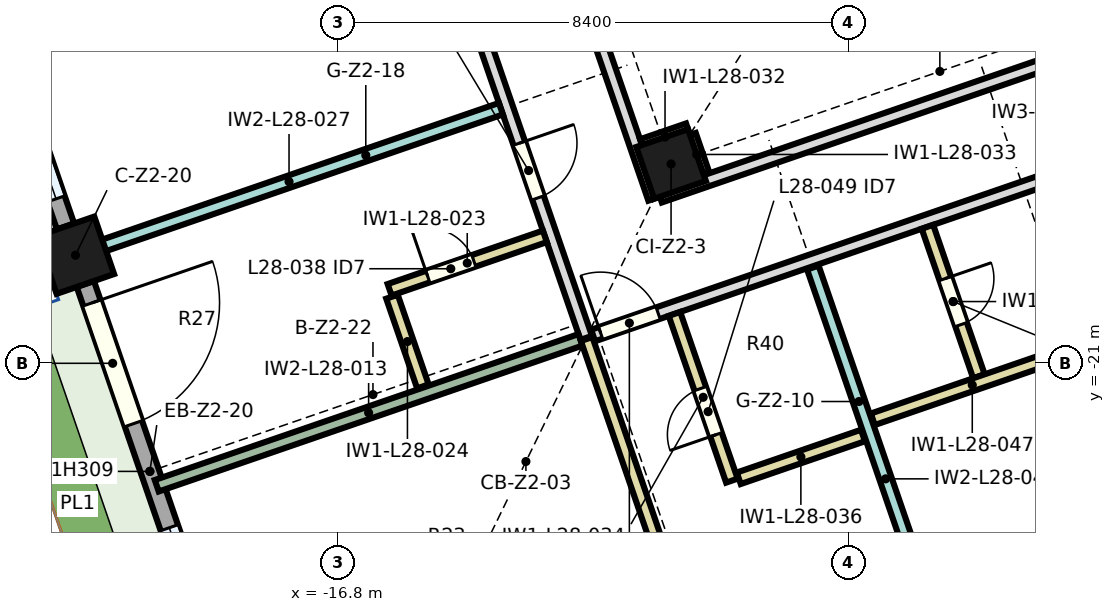
"""IFC4 building model, lengths in metres.
Left out: names, types, materials, properties, quantities, classifications, styles, units other than length and angle.
Written with IfcOpenShell. Run it as: python <this file> out.ifc"""

import sys

from ifc_helpers import new_model, si_unit, direction, frame, frame_2d, origin, origin_2d, place, context, subcontext, project, spatial, rectangle, extrude, element, fill, save


model = new_model("IFC4")
c1 = context("Model", 3, precision=1e-05, world=origin(), true_north=direction((0.0, 1.0)))
c2 = subcontext(c1, "Body", "Model", "MODEL_VIEW")
j1 = project(units=[si_unit("LENGTHUNIT", "METRE"), si_unit("PLANEANGLEUNIT", "RADIAN")], contexts=[c1])
p1 = place(None, origin())
s1 = spatial("IfcSite", under=j1, at=p1, CompositionType="ELEMENT")
p2 = place(p1, origin())
s2 = spatial("IfcBuilding", under=s1, at=p2, CompositionType="ELEMENT")
p3 = place(p2, frame((0.0, 0.0, 134.5)))
s3 = spatial("IfcBuildingStorey", under=s2, at=p3, CompositionType="ELEMENT", Elevation=134.5)
p4 = place(p3, frame((-21.1, -19.195, 0.0), z_axis=(0.0, 0.0, 1.0), x_axis=(0.945518575599, 0.325568154457, 0.0)))
e1 = element("IfcColumn", 1, at=p4, inside=s3, PredefinedType="COLUMN", context=c2, shape_type="SweptSolid", body=[
    extrude(rectangle(XDim=1.0, YDim=1.0, at=origin_2d()), origin(), (0.0, 0.0, 1.0), 3.55),
])
p5 = place(p3, frame((-11.305, -17.695, 0.0), z_axis=(0.0, 0.0, 1.0), x_axis=(0.945518575599, 0.325568154457, 0.0)))
e2 = element("IfcColumn", 2, at=p5, inside=s3, PredefinedType="COLUMN", context=c2, shape_type="SweptSolid", body=[
    extrude(rectangle(XDim=0.9, YDim=0.9, at=origin_2d()), origin(), (0.0, 0.0, 1.0), 3.55),
])
p6 = place(p3, frame((-23.386, -12.558, 0.0), z_axis=(0.0, 0.0, 1.0), x_axis=(0.325580990241, -0.945514155787, 0.0)))
e3 = element("IfcWall", 3, at=p6, inside=s3, PredefinedType="SOLIDWALL", context=c2, shape_type="SweptSolid", body=[
    extrude(rectangle(XDim=6.52, YDim=0.3, at=frame_2d((3.26, 0.0))), origin(), (0.0, 0.0, 1.0), 3.09),
])
p7 = place(p6, frame((0.33, 0.0, 0.0)))
e4 = element("IfcOpeningElement", 4, at=p7, cuts=e3, PredefinedType="OPENING", context=c2, shape_type="SweptSolid", body=[
    extrude(rectangle(XDim=2.1, YDim=2.4, at=frame_2d((1.05, 1.2))), frame((0.0, 0.16, 0.0), z_axis=(0.0, -1.0, 0.0), x_axis=(1.0, 0.0, 0.0)), (0.0, 0.0, 1.0), 0.32),
])
p8 = place(p6, frame((4.24, 0.0, 0.9)))
e5 = element("IfcOpeningElement", 5, at=p8, cuts=e3, PredefinedType="OPENING", context=c2, shape_type="SweptSolid", body=[
    extrude(rectangle(XDim=1.8, YDim=1.5, at=frame_2d((0.9, 0.75))), frame((0.0, 0.16, 0.0), z_axis=(0.0, -1.0, 0.0), x_axis=(1.0, 0.0, 0.0)), (0.0, 0.0, 1.0), 0.32),
])
p9 = place(p3, frame((-20.938, -19.668, 0.0), z_axis=(0.0, 0.0, 1.0), x_axis=(0.325592517631, -0.945510186335, 0.0)))
e6 = element("IfcWall", 6, at=p9, inside=s3, PredefinedType="SOLIDWALL", context=c2, shape_type="SweptSolid", body=[
    extrude(rectangle(XDim=6.52, YDim=0.3, at=frame_2d((3.26, 0.0))), origin(), (0.0, 0.0, 1.0), 3.09),
])
p10 = place(p9, frame((0.33, 0.0, 0.0)))
e7 = element("IfcOpeningElement", 7, at=p10, cuts=e6, PredefinedType="OPENING", context=c2, shape_type="SweptSolid", body=[
    extrude(rectangle(XDim=2.1, YDim=2.4, at=frame_2d((1.05, 1.2))), frame((0.0, 0.16, 0.0), z_axis=(0.0, -1.0, 0.0), x_axis=(1.0, 0.0, 0.0)), (0.0, 0.0, 1.0), 0.32),
])
p11 = place(p9, frame((4.24, 0.0, 0.9)))
e8 = element("IfcOpeningElement", 8, at=p11, cuts=e6, PredefinedType="OPENING", context=c2, shape_type="SweptSolid", body=[
    extrude(rectangle(XDim=1.8, YDim=1.5, at=frame_2d((0.9, 0.75))), frame((0.0, 0.16, 0.0), z_axis=(0.0, -1.0, 0.0), x_axis=(1.0, 0.0, 0.0)), (0.0, 0.0, 1.0), 0.32),
])
p12 = place(p3, frame((-22.623, 8.265, 0.0), z_axis=(0.0, 0.0, 1.0), x_axis=(0.325567058058, -0.945518953119, 0.0)))
e9 = element("IfcWall", 9, at=p12, inside=s3, PredefinedType="PARTITIONING", context=c2, shape_type="SweptSolid", body=[
    extrude(rectangle(XDim=30.48, YDim=0.2, at=frame_2d((15.24, 0.0))), origin(), (0.0, 0.0, 1.0), 3.55),
])
p13 = place(p12, frame((4.195, 0.0, 0.0)))
e10 = element("IfcOpeningElement", 10, at=p13, cuts=e9, PredefinedType="OPENING", context=c2, shape_type="SweptSolid", body=[
    extrude(rectangle(XDim=0.95, YDim=2.1, at=frame_2d((0.475, 1.05))), frame((0.0, 0.11, 0.0), z_axis=(0.0, -1.0, 0.0), x_axis=(1.0, 0.0, 0.0)), (0.0, 0.0, 1.0), 0.22),
])
p14 = place(p12, frame((10.045, 0.0, 0.0)))
e11 = element("IfcOpeningElement", 11, at=p14, cuts=e9, PredefinedType="OPENING", context=c2, shape_type="SweptSolid", body=[
    extrude(rectangle(XDim=0.95, YDim=2.1, at=frame_2d((0.475, 1.05))), frame((0.0, 0.11, 0.0), z_axis=(0.0, -1.0, 0.0), x_axis=(1.0, 0.0, 0.0)), (0.0, 0.0, 1.0), 0.22),
])
p15 = place(p12, frame((21.42, 0.0, 0.0)))
e12 = element("IfcOpeningElement", 12, at=p15, cuts=e9, PredefinedType="OPENING", context=c2, shape_type="SweptSolid", body=[
    extrude(rectangle(XDim=1.0, YDim=2.1, at=frame_2d((0.5, 1.05))), frame((0.0, 0.11, 0.0), z_axis=(0.0, -1.0, 0.0), x_axis=(1.0, 0.0, 0.0)), (0.0, 0.0, 1.0), 0.22),
])
p16 = place(p12, frame((27.095, 0.0, 0.0)))
e13 = element("IfcOpeningElement", 13, at=p16, cuts=e9, PredefinedType="OPENING", context=c2, shape_type="SweptSolid", body=[
    extrude(rectangle(XDim=0.95, YDim=2.1, at=frame_2d((0.475, 1.05))), frame((0.0, 0.11, 0.0), z_axis=(0.0, -1.0, 0.0), x_axis=(1.0, 0.0, 0.0)), (0.0, 0.0, 1.0), 0.22),
])
p17 = place(p3, frame((-19.763, -22.987, 0.0), z_axis=(0.0, 0.0, 1.0), x_axis=(0.945516523202, 0.32557411499, 0.0)))
e14 = element("IfcWall", 14, at=p17, inside=s3, PredefinedType="PARTITIONING", context=c2, shape_type="SweptSolid", body=[
    extrude(rectangle(XDim=7.37, YDim=0.2, at=frame_2d((3.685, 0.0))), origin(), (0.0, 0.0, 1.0), 3.55),
])
p18 = place(p3, frame((-17.892, 0.051, 0.0), z_axis=(0.0, 0.0, 1.0), x_axis=(0.325580537834, -0.94551431157, 0.0)))
e15 = element("IfcWall", 15, at=p18, inside=s3, PredefinedType="PARTITIONING", context=c2, shape_type="SweptSolid", body=[
    extrude(rectangle(XDim=19.374, YDim=0.2, at=frame_2d((9.687, 0.0))), origin(), (0.0, 0.0, 1.0), 3.55),
])
p19 = place(p18, frame((9.786, 0.0, 0.0)))
e16 = element("IfcOpeningElement", 16, at=p19, cuts=e15, PredefinedType="OPENING", context=c2, shape_type="SweptSolid", body=[
    extrude(rectangle(XDim=0.9, YDim=2.1, at=frame_2d((0.45, 1.05))), frame((0.0, 0.11, 0.0), z_axis=(0.0, -1.0, 0.0), x_axis=(1.0, 0.0, 0.0)), (0.0, 0.0, 1.0), 0.22),
])
p20 = place(p3, frame((-15.934, -19.764, 0.0), z_axis=(0.0, 0.0, 1.0), x_axis=(0.945536217154, 0.325516915153, 0.0)))
e17 = element("IfcWall", 17, at=p20, inside=s3, PredefinedType="PARTITIONING", context=c2, shape_type="SweptSolid", body=[
    extrude(rectangle(XDim=2.7, YDim=0.2, at=frame_2d((1.35, 0.0))), origin(), (0.0, 0.0, 1.0), 3.55),
])
p21 = place(p20, frame((0.664, 0.0, 0.0)))
e18 = element("IfcOpeningElement", 18, at=p21, cuts=e17, PredefinedType="OPENING", context=c2, shape_type="SweptSolid", body=[
    extrude(rectangle(XDim=0.8, YDim=2.1, at=frame_2d((0.4, 1.05))), frame((0.0, 0.11, 0.0), z_axis=(0.0, -1.0, 0.0), x_axis=(1.0, 0.0, 0.0)), (0.0, 0.0, 1.0), 0.22),
])
p22 = place(p3, frame((-15.386, -21.353, 0.0), z_axis=(0.0, 0.0, 1.0), x_axis=(-0.325508352099, 0.945539165087, 0.0)))
e19 = element("IfcWall", 19, at=p22, inside=s3, PredefinedType="PARTITIONING", context=c2, shape_type="SweptSolid", body=[
    extrude(rectangle(XDim=1.56, YDim=0.2, at=frame_2d((0.78, 0.0))), origin(), (0.0, 0.0, 1.0), 3.55),
])
p23 = place(p3, frame((-14.103, -16.786, 0.0), z_axis=(0.0, 0.0, 1.0), x_axis=(-0.945520034471, -0.325563917555, 0.0)))
e20 = element("IfcWall", 20, at=p23, inside=s3, PredefinedType="PARTITIONING", context=c2, shape_type="SweptSolid", body=[
    extrude(rectangle(XDim=7.37, YDim=0.2, at=frame_2d((3.685, 0.0))), origin(), (0.0, 0.0, 1.0), 2.65),
])
p24 = place(p3, frame((-12.694, -20.573, 0.0), z_axis=(0.0, 0.0, 1.0), x_axis=(0.325571534525, -0.945517411742, 0.0)))
e21 = element("IfcWall", 21, at=p24, inside=s3, PredefinedType="PARTITIONING", context=c2, shape_type="SweptSolid", body=[
    extrude(rectangle(XDim=7.45, YDim=0.2, at=frame_2d((3.725, 0.0))), origin(), (0.0, 0.0, 1.0), 3.55),
])
p25 = place(p24, frame((4.03, 0.0, 0.0)))
e22 = element("IfcOpeningElement", 22, at=p25, cuts=e21, PredefinedType="OPENING", context=c2, shape_type="SweptSolid", body=[
    extrude(rectangle(XDim=0.9, YDim=2.1, at=frame_2d((0.45, 1.05))), frame((0.0, 0.11, 0.0), z_axis=(0.0, -1.0, 0.0), x_axis=(1.0, 0.0, 0.0)), (0.0, 0.0, 1.0), 0.22),
])
p26 = place(p3, frame((-12.586, -20.515, 0.0), z_axis=(0.0, 0.0, 1.0), x_axis=(0.945519939336, 0.325564193852, 0.0)))
e23 = element("IfcWall", 23, at=p26, inside=s3, PredefinedType="PARTITIONING", context=c2, shape_type="SweptSolid", body=[
    extrude(rectangle(XDim=37.28, YDim=0.2, at=frame_2d((18.64, 0.0))), origin(), (0.0, 0.0, 1.0), 3.55),
])
p27 = place(p26, frame((9.83, 0.0, 0.0)))
e24 = element("IfcOpeningElement", 24, at=p27, cuts=e23, PredefinedType="OPENING", context=c2, shape_type="SweptSolid", body=[
    extrude(rectangle(XDim=1.0, YDim=2.1, at=frame_2d((0.5, 1.05))), frame((0.0, 0.11, 0.0), z_axis=(0.0, -1.0, 0.0), x_axis=(1.0, 0.0, 0.0)), (0.0, 0.0, 1.0), 0.22),
])
p28 = place(p26, frame((18.93, 0.0, 0.0)))
e25 = element("IfcOpeningElement", 25, at=p28, cuts=e23, PredefinedType="OPENING", context=c2, shape_type="SweptSolid", body=[
    extrude(rectangle(XDim=1.0, YDim=2.1, at=frame_2d((0.5, 1.05))), frame((0.0, 0.11, 0.0), z_axis=(0.0, -1.0, 0.0), x_axis=(1.0, 0.0, 0.0)), (0.0, 0.0, 1.0), 0.22),
])
p29 = place(p26, frame((30.28, 0.0, 0.0)))
e26 = element("IfcOpeningElement", 26, at=p29, cuts=e23, PredefinedType="OPENING", context=c2, shape_type="SweptSolid", body=[
    extrude(rectangle(XDim=1.0, YDim=2.1, at=frame_2d((0.5, 1.05))), frame((0.0, 0.11, 0.0), z_axis=(0.0, -1.0, 0.0), x_axis=(1.0, 0.0, 0.0)), (0.0, 0.0, 1.0), 0.22),
])
p30 = place(p26, frame((0.13, 0.0, 0.0)))
e27 = element("IfcOpeningElement", 27, at=p30, cuts=e23, PredefinedType="OPENING", context=c2, shape_type="SweptSolid", body=[
    extrude(rectangle(XDim=1.0, YDim=2.1, at=frame_2d((0.5, 1.05))), frame((0.0, 0.11, 0.0), z_axis=(0.0, -1.0, 0.0), x_axis=(1.0, 0.0, 0.0)), (0.0, 0.0, 1.0), 0.22),
])
p31 = place(p26, frame((34.23, 0.0, 0.0)))
e28 = element("IfcOpeningElement", 28, at=p31, cuts=e23, PredefinedType="OPENING", context=c2, shape_type="SweptSolid", body=[
    extrude(rectangle(XDim=1.1, YDim=2.1, at=frame_2d((0.55, 1.05))), frame((0.0, 0.11, 0.0), z_axis=(0.0, -1.0, 0.0), x_axis=(1.0, 0.0, 0.0)), (0.0, 0.0, 1.0), 0.22),
])
p32 = place(p3, frame((-11.49, -18.234, 0.0), z_axis=(0.0, 0.0, 1.0), x_axis=(0.945522545762, 0.325556624039, 0.0)))
e29 = element("IfcWall", 29, at=p32, inside=s3, PredefinedType="PARTITIONING", context=c2, shape_type="SweptSolid", body=[
    extrude(rectangle(XDim=16.382, YDim=0.2, at=frame_2d((8.191, 0.0))), origin(), (0.0, 0.0, 1.0), 3.55),
])
p33 = place(p32, frame((6.851, 0.0, 0.0)))
e30 = element("IfcOpeningElement", 30, at=p33, cuts=e29, PredefinedType="OPENING", context=c2, shape_type="SweptSolid", body=[
    extrude(rectangle(XDim=0.9, YDim=2.1, at=frame_2d((0.45, 1.05))), frame((0.0, 0.11, 0.0), z_axis=(0.0, -1.0, 0.0), x_axis=(1.0, 0.0, 0.0)), (0.0, 0.0, 1.0), 0.22),
])
p34 = place(p32, frame((11.152, 0.0, 0.0)))
e31 = element("IfcOpeningElement", 31, at=p34, cuts=e29, PredefinedType="OPENING", context=c2, shape_type="SweptSolid", body=[
    extrude(rectangle(XDim=2.0, YDim=2.1, at=frame_2d((1.0, 1.05))), frame((0.0, 0.11, 0.0), z_axis=(0.0, -1.0, 0.0), x_axis=(1.0, 0.0, 0.0)), (0.0, 0.0, 1.0), 0.22),
])
p35 = place(p3, frame((-11.026, -17.123, 0.0), z_axis=(0.0, 0.0, 1.0), x_axis=(-0.945525269499, -0.325548713312, 0.0)))
e32 = element("IfcWall", 32, at=p35, inside=s3, PredefinedType="PARTITIONING", context=c2, shape_type="SweptSolid", body=[
    extrude(rectangle(XDim=0.8, YDim=0.2, at=frame_2d((0.4, 0.0))), origin(), (0.0, 0.0, 1.0), 3.55),
])
p36 = place(p3, frame((-10.772, -17.86, 0.0), z_axis=(0.0, 0.0, 1.0), x_axis=(-0.325691873105, 0.945475966798, 0.0)))
e33 = element("IfcWall", 33, at=p36, inside=s3, PredefinedType="PARTITIONING", context=c2, shape_type="SweptSolid", body=[
    extrude(rectangle(XDim=0.68, YDim=0.2, at=frame_2d((0.34, 0.0))), origin(), (0.0, 0.0, 1.0), 3.55),
])
p37 = place(p3, frame((-10.305, -22.903, 0.0), z_axis=(0.0, 0.0, 1.0), x_axis=(-0.325632622122, 0.945496375144, 0.0)))
e34 = element("IfcWall", 34, at=p37, inside=s3, PredefinedType="PARTITIONING", context=c2, shape_type="SweptSolid", body=[
    extrude(rectangle(XDim=2.9, YDim=0.2, at=frame_2d((1.45, 0.0))), origin(), (0.0, 0.0, 1.0), 3.55),
])
p38 = place(p37, frame((0.8, 0.0, 0.0)))
e35 = element("IfcOpeningElement", 35, at=p38, cuts=e34, PredefinedType="OPENING", context=c2, shape_type="SweptSolid", body=[
    extrude(rectangle(XDim=0.8, YDim=2.1, at=frame_2d((0.4, 1.05))), frame((0.0, 0.11, 0.0), z_axis=(0.0, -1.0, 0.0), x_axis=(1.0, 0.0, 0.0)), (0.0, 0.0, 1.0), 0.22),
])
p39 = place(p3, frame((-8.149, -22.16, 0.0), z_axis=(0.0, 0.0, 1.0), x_axis=(-0.945506217839, -0.325604041787, 0.0)))
e36 = element("IfcWall", 36, at=p39, inside=s3, PredefinedType="PARTITIONING", context=c2, shape_type="SweptSolid", body=[
    extrude(rectangle(XDim=2.16, YDim=0.2, at=frame_2d((1.08, 0.0))), origin(), (0.0, 0.0, 1.0), 3.55),
])
p40 = place(p3, frame((-7.089, -18.728, 0.0), z_axis=(0.0, 0.0, 1.0), x_axis=(0.325565238158, -0.945519579757, 0.0)))
e37 = element("IfcWall", 37, at=p40, inside=s3, PredefinedType="PARTITIONING", context=c2, shape_type="SweptSolid", body=[
    extrude(rectangle(XDim=2.6, YDim=0.2, at=frame_2d((1.3, 0.0))), origin(), (0.0, 0.0, 1.0), 3.55),
])
p41 = place(p40, frame((0.9, 0.0, 0.0)))
e38 = element("IfcOpeningElement", 38, at=p41, cuts=e37, PredefinedType="OPENING", context=c2, shape_type="SweptSolid", body=[
    extrude(rectangle(XDim=0.8, YDim=2.1, at=frame_2d((0.4, 1.05))), frame((0.0, 0.11, 0.0), z_axis=(0.0, -1.0, 0.0), x_axis=(1.0, 0.0, 0.0)), (0.0, 0.0, 1.0), 0.22),
])
p42 = place(p3, frame((-6.581, -26.348, 0.0), z_axis=(0.0, 0.0, 1.0), x_axis=(-0.325549451152, 0.945525015457, 0.0)))
e39 = element("IfcWall", 39, at=p42, inside=s3, PredefinedType="PARTITIONING", context=c2, shape_type="SweptSolid", body=[
    extrude(rectangle(XDim=7.35, YDim=0.2, at=frame_2d((3.675, 0.0))), origin(), (0.0, 0.0, 1.0), 2.65),
])
p43 = place(p3, frame((-4.716, -20.767, 0.0), z_axis=(0.0, 0.0, 1.0), x_axis=(-0.945518358783, -0.325568784136, 0.0)))
e40 = element("IfcWall", 40, at=p43, inside=s3, PredefinedType="PARTITIONING", context=c2, shape_type="SweptSolid", body=[
    extrude(rectangle(XDim=3.46, YDim=0.2, at=frame_2d((1.73, 0.0))), origin(), (0.0, 0.0, 1.0), 3.55),
])
p44 = place(p8, origin())
e41 = element("IfcWindow", 41, at=p44, inside=s3, PartitioningType="SINGLE_PANEL", PredefinedType="WINDOW", context=c2, shape_type="SweptSolid", body=[
    extrude(rectangle(XDim=1.8, YDim=1.5, at=frame_2d((0.9, 0.75))), frame((0.0, 0.03, 0.0), z_axis=(0.0, -1.0, 0.0), x_axis=(1.0, 0.0, 0.0)), (0.0, 0.0, 1.0), 0.06),
])
fill(e5, e41)
p45 = place(p10, origin())
e42 = element("IfcDoor", 42, at=p45, inside=s3, OperationType="SLIDING_TO_LEFT", PredefinedType="DOOR", context=c2, shape_type="SweptSolid", body=[
    extrude(rectangle(XDim=2.1, YDim=2.4, at=frame_2d((1.05, 1.2))), frame((0.0, 0.025, 0.0), z_axis=(0.0, -1.0, 0.0), x_axis=(1.0, 0.0, 0.0)), (0.0, 0.0, 1.0), 0.05),
])
fill(e7, e42)
p46 = place(p11, origin())
e43 = element("IfcWindow", 43, at=p46, inside=s3, PartitioningType="SINGLE_PANEL", PredefinedType="WINDOW", context=c2, shape_type="SweptSolid", body=[
    extrude(rectangle(XDim=1.8, YDim=1.5, at=frame_2d((0.9, 0.75))), frame((0.0, 0.03, 0.0), z_axis=(0.0, -1.0, 0.0), x_axis=(1.0, 0.0, 0.0)), (0.0, 0.0, 1.0), 0.06),
])
fill(e8, e43)
p47 = place(p16, origin())
e44 = element("IfcDoor", 44, at=p47, inside=s3, OperationType="NOTDEFINED", PredefinedType="DOOR", context=c2, shape_type="SweptSolid", body=[
    extrude(rectangle(XDim=0.95, YDim=2.1, at=frame_2d((0.475, 1.05))), frame((0.0, 0.025, 0.0), z_axis=(0.0, -1.0, 0.0), x_axis=(1.0, 0.0, 0.0)), (0.0, 0.0, 1.0), 0.05),
])
fill(e13, e44)
p48 = place(p21, origin())
e45 = element("IfcDoor", 45, at=p48, inside=s3, OperationType="NOTDEFINED", PredefinedType="DOOR", context=c2, shape_type="SweptSolid", body=[
    extrude(rectangle(XDim=0.8, YDim=2.1, at=frame_2d((0.4, 1.05))), frame((0.0, 0.025, 0.0), z_axis=(0.0, -1.0, 0.0), x_axis=(1.0, 0.0, 0.0)), (0.0, 0.0, 1.0), 0.05),
])
fill(e18, e45)
p49 = place(p41, origin())
e46 = element("IfcDoor", 46, at=p49, inside=s3, OperationType="NOTDEFINED", PredefinedType="DOOR", context=c2, shape_type="SweptSolid", body=[
    extrude(rectangle(XDim=0.8, YDim=2.1, at=frame_2d((0.4, 1.05))), frame((0.0, 0.025, 0.0), z_axis=(0.0, -1.0, 0.0), x_axis=(1.0, 0.0, 0.0)), (0.0, 0.0, 1.0), 0.05),
])
fill(e38, e46)
p50 = place(p30, origin())
e47 = element("IfcDoor", 47, at=p50, inside=s3, OperationType="NOTDEFINED", PredefinedType="DOOR", context=c2, shape_type="SweptSolid", body=[
    extrude(rectangle(XDim=1.0, YDim=2.1, at=frame_2d((0.5, 1.05))), frame((0.0, 0.025, 0.0), z_axis=(0.0, -1.0, 0.0), x_axis=(1.0, 0.0, 0.0)), (0.0, 0.0, 1.0), 0.05),
])
fill(e27, e47)
p51 = place(p38, origin())
e48 = element("IfcDoor", 48, at=p51, inside=s3, OperationType="NOTDEFINED", PredefinedType="DOOR", context=c2, shape_type="SweptSolid", body=[
    extrude(rectangle(XDim=0.8, YDim=2.1, at=frame_2d((0.4, 1.05))), frame((0.0, 0.025, 0.0), z_axis=(0.0, -1.0, 0.0), x_axis=(1.0, 0.0, 0.0)), (0.0, 0.0, 1.0), 0.05),
])
fill(e35, e48)
save(model, sys.argv[1])
